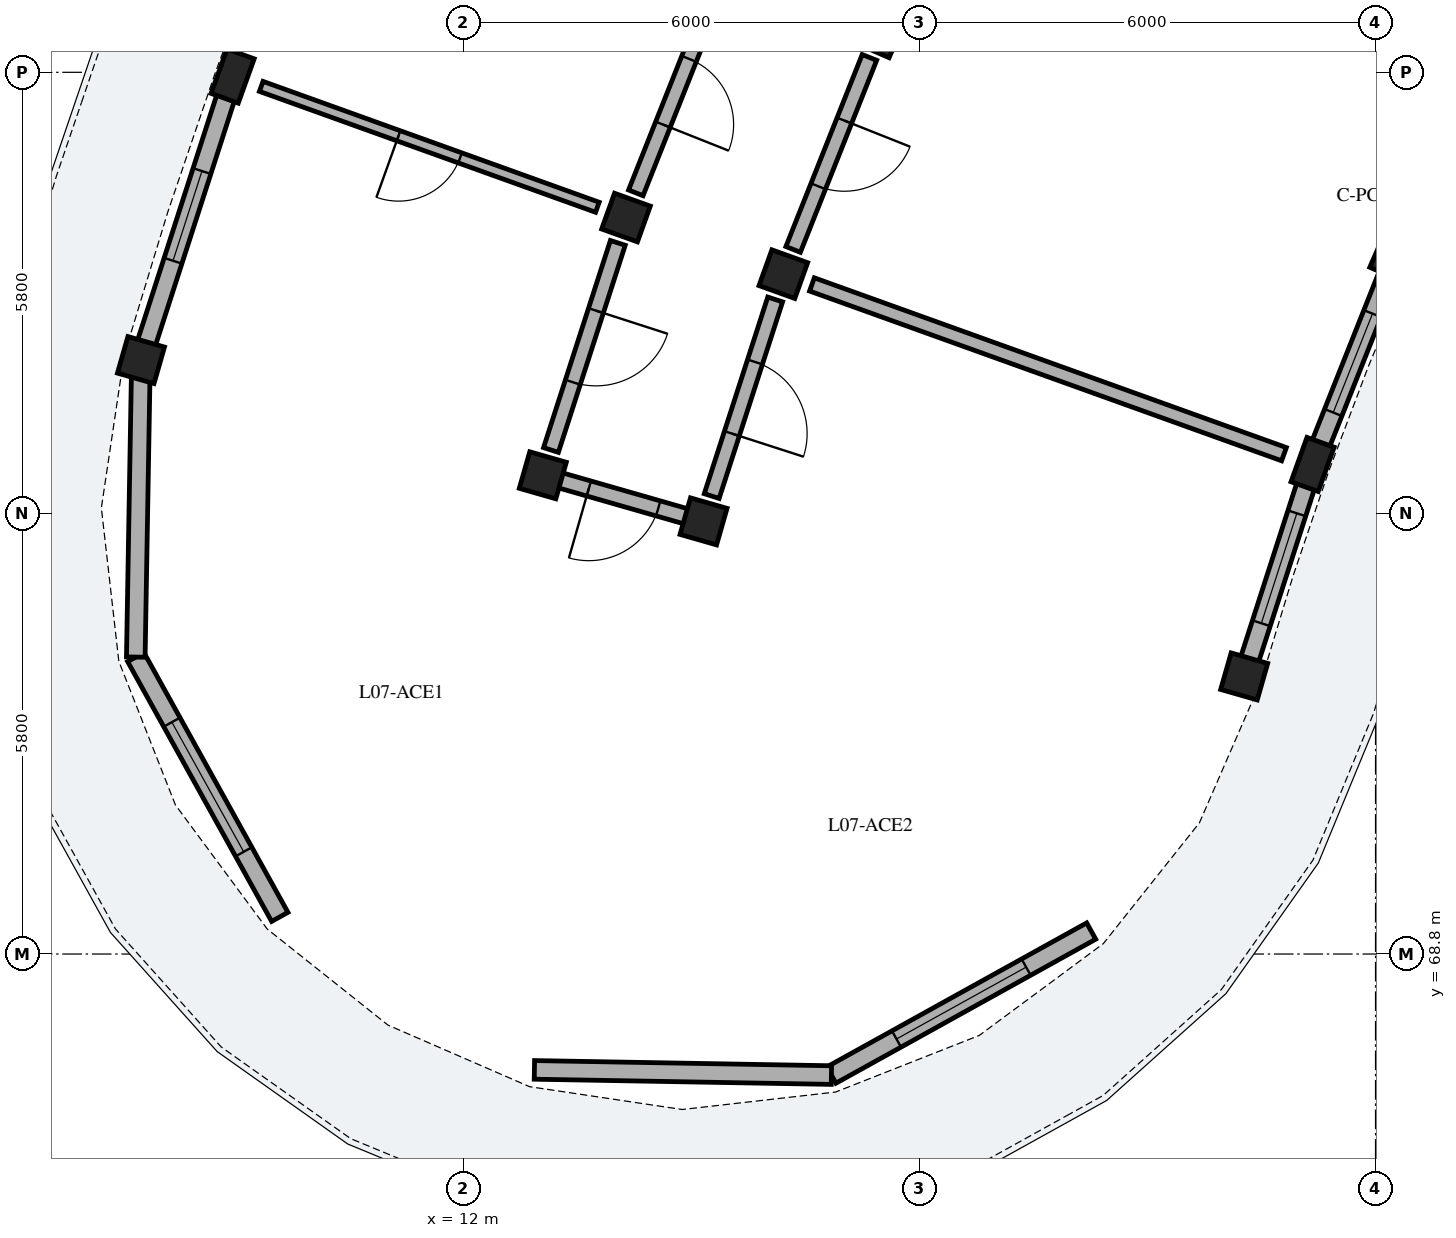
"""IFC4 building model, lengths in metres.
Left out: names, types, materials, properties, quantities, classifications, styles, units other than length and angle.
Written with IfcOpenShell. Run it as: python <this file> out.ifc"""

import sys

from ifc_helpers import new_model, si_unit, direction, frame, frame_2d, origin, origin_2d, place, context, subcontext, project, spatial, rectangle, extrude, element, fill, save


model = new_model("IFC4")
c1 = context("Model", 3, precision=1e-05, world=origin(), true_north=direction((0.0, 1.0)))
c2 = subcontext(c1, "Body", "Model", "MODEL_VIEW")
j1 = project(units=[si_unit("LENGTHUNIT", "METRE"), si_unit("PLANEANGLEUNIT", "RADIAN")], contexts=[c1])
p1 = place(None, origin())
s1 = spatial("IfcSite", under=j1, at=p1, CompositionType="ELEMENT")
p2 = place(p1, origin())
s2 = spatial("IfcBuilding", under=s1, at=p2, CompositionType="ELEMENT")
p3 = place(p2, frame((0.0, 0.0, 25.64)))
s3 = spatial("IfcBuildingStorey", under=s2, at=p3, CompositionType="ELEMENT", Elevation=25.64)
for number, where, z_axis, x_axis in (
    (1, (24.254, 77.964, 0.0), (0.0, 0.0, 1.0), (-0.917, 0.4, 0.0)),
    (2, (17.47, 80.921, 0.0), (0.0, 0.0, 1.0), (-0.917, 0.4, 0.0)),
):
    element("IfcColumn", number, at=place(p3, frame(where, z_axis=z_axis, x_axis=x_axis)), inside=s3, PredefinedType="COLUMN", context=c2, shape_type="SweptSolid", body=[
        extrude(rectangle(XDim=0.5, YDim=0.5, at=origin_2d()), origin(), (0.0, 0.0, 1.0), 3.11),
    ])
p4 = place(p3, frame((23.172, 75.241, 0.0), z_axis=(0.0, 0.0, 1.0), x_axis=(-0.941012100316, 0.338372911236, 0.0)))
e3 = element("IfcColumn", 3, at=p4, inside=s3, PredefinedType="PILASTER", context=c2, shape_type="SweptSolid", body=[
    extrude(rectangle(XDim=0.38, YDim=0.62, at=origin_2d()), origin(), (0.0, 0.0, 1.0), 3.11),
])
for number, where, z_axis, x_axis in (
    (4, (16.208, 77.745, 0.0), (0.0, 0.0, 1.0), (-0.941, 0.338, 0.0)),
    (5, (14.138, 78.489, 0.0), (0.0, 0.0, 1.0), (-0.941, 0.338, 0.0)),
):
    element("IfcColumn", number, at=place(p3, frame(where, z_axis=z_axis, x_axis=x_axis)), inside=s3, PredefinedType="COLUMN", context=c2, shape_type="SweptSolid", body=[
        extrude(rectangle(XDim=0.5, YDim=0.5, at=origin_2d()), origin(), (0.0, 0.0, 1.0), 3.11),
    ])
p5 = place(p3, frame((8.963, 80.35, 0.0), z_axis=(0.0, 0.0, 1.0), x_axis=(-0.941012100316, 0.338372911236, 0.0)))
e6 = element("IfcColumn", 6, at=p5, inside=s3, PredefinedType="PILASTER", context=c2, shape_type="SweptSolid", body=[
    extrude(rectangle(XDim=0.38, YDim=0.62, at=origin_2d()), origin(), (0.0, 0.0, 1.0), 3.11),
])
for number, where, z_axis, x_axis in (
    (7, (22.272, 72.452, 0.0), (0.0, 0.0, 1.0), (-0.961, 0.276, 0.0)),
    (8, (15.159, 74.492, 0.0), (0.0, 0.0, 1.0), (-0.961, 0.276, 0.0)),
    (9, (13.044, 75.098, 0.0), (0.0, 0.0, 1.0), (-0.961, 0.276, 0.0)),
    (10, (7.757, 76.614, 0.0), (0.0, 0.0, 1.0), (-0.961, 0.276, 0.0)),
):
    element("IfcColumn", number, at=place(p3, frame(where, z_axis=z_axis, x_axis=x_axis)), inside=s3, PredefinedType="COLUMN", context=c2, shape_type="SweptSolid", body=[
        extrude(rectangle(XDim=0.5, YDim=0.5, at=origin_2d()), origin(), (0.0, 0.0, 1.0), 3.11),
    ])
p6 = place(p3, frame((24.173, 77.76, 0.0), z_axis=(0.0, 0.0, 1.0), x_axis=(-0.36914482699, -0.92937188289, 0.0)))
e11 = element("IfcWall", 11, at=p6, inside=s3, PredefinedType="SOLIDWALL", context=c2, shape_type="SweptSolid", body=[
    extrude(rectangle(XDim=2.55, YDim=0.245, at=frame_2d((1.275, 0.0))), origin(), (0.0, 0.0, 1.0), 2.355),
])
p7 = place(p6, frame((0.575, 0.0, 0.55)))
e12 = element("IfcOpeningElement", 12, at=p7, cuts=e11, PredefinedType="OPENING", context=c2, shape_type="SweptSolid", body=[
    extrude(rectangle(XDim=1.4, YDim=1.635, at=frame_2d((0.7, 0.817))), frame((0.0, 0.133, 0.0), z_axis=(0.0, -1.0, 0.0), x_axis=(1.0, 0.0, 0.0)), (0.0, 0.0, 1.0), 0.265),
])
p8 = place(p3, frame((8.914, 80.198, 0.0), z_axis=(0.0, 0.0, 1.0), x_axis=(-0.30716573199, -0.951656037175, 0.0)))
e13 = element("IfcWall", 13, at=p8, inside=s3, PredefinedType="SOLIDWALL", context=c2, shape_type="SweptSolid", body=[
    extrude(rectangle(XDim=3.546, YDim=0.245, at=frame_2d((1.773, 0.0))), origin(), (0.0, 0.0, 1.0), 2.355),
])
p9 = place(p8, frame((1.153, 0.0, 0.55)))
e14 = element("IfcOpeningElement", 14, at=p9, cuts=e13, PredefinedType="OPENING", context=c2, shape_type="SweptSolid", body=[
    extrude(rectangle(XDim=1.24, YDim=1.535, at=frame_2d((0.62, 0.768))), frame((0.0, 0.133, 0.0), z_axis=(0.0, -1.0, 0.0), x_axis=(1.0, 0.0, 0.0)), (0.0, 0.0, 1.0), 0.265),
])
p10 = place(p3, frame((23.123, 75.088, 0.0), z_axis=(0.0, 0.0, 1.0), x_axis=(-0.307109066975, -0.951674325062, 0.0)))
e15 = element("IfcWall", 15, at=p10, inside=s3, PredefinedType="SOLIDWALL", context=c2, shape_type="SweptSolid", body=[
    extrude(rectangle(XDim=2.55, YDim=0.245, at=frame_2d((1.275, 0.0))), origin(), (0.0, 0.0, 1.0), 2.355),
])
p11 = place(p10, frame((0.515, 0.0, 0.55)))
e16 = element("IfcOpeningElement", 16, at=p11, cuts=e15, PredefinedType="OPENING", context=c2, shape_type="SweptSolid", body=[
    extrude(rectangle(XDim=1.52, YDim=1.485, at=frame_2d((0.76, 0.743))), frame((0.0, 0.133, 0.0), z_axis=(0.0, -1.0, 0.0), x_axis=(1.0, 0.0, 0.0)), (0.0, 0.0, 1.0), 0.265),
])
p12 = place(p3, frame((20.259, 69.102, 0.0), z_axis=(0.0, 0.0, 1.0), x_axis=(-0.874643043537, -0.484767517881, 0.0)))
e17 = element("IfcWall", 17, at=p12, inside=s3, PredefinedType="SOLIDWALL", context=c2, shape_type="SweptSolid", body=[
    extrude(rectangle(XDim=3.908, YDim=0.245, at=frame_2d((1.954, 0.0))), origin(), (0.0, 0.0, 1.0), 2.355),
])
p13 = place(p12, frame((0.979, 0.0, 0.4)))
e18 = element("IfcOpeningElement", 18, at=p13, cuts=e17, PredefinedType="OPENING", context=c2, shape_type="SweptSolid", body=[
    extrude(rectangle(XDim=1.95, YDim=1.78, at=frame_2d((0.975, 0.89))), frame((0.0, 0.133, 0.0), z_axis=(0.0, -1.0, 0.0), x_axis=(1.0, 0.0, 0.0)), (0.0, 0.0, 1.0), 0.265),
])
p14 = place(p3, frame((16.841, 67.208, 0.0), z_axis=(0.0, 0.0, 1.0), x_axis=(-0.999848096392, 0.017429404492, 0.0)))
e19 = element("IfcWall", 19, at=p14, inside=s3, PredefinedType="SOLIDWALL", context=c2, shape_type="SweptSolid", body=[
    extrude(rectangle(XDim=3.908, YDim=0.245, at=frame_2d((1.954, 0.0))), origin(), (0.0, 0.0, 1.0), 2.355),
])
p15 = place(p3, frame((9.583, 69.289, 0.0), z_axis=(0.0, 0.0, 1.0), x_axis=(-0.484841794757, 0.874601871743, 0.0)))
e20 = element("IfcWall", 20, at=p15, inside=s3, PredefinedType="SOLIDWALL", context=c2, shape_type="SweptSolid", body=[
    extrude(rectangle(XDim=3.908, YDim=0.245, at=frame_2d((1.954, 0.0))), origin(), (0.0, 0.0, 1.0), 2.355),
])
p16 = place(p15, frame((0.979, 0.0, 0.4)))
e21 = element("IfcOpeningElement", 21, at=p16, cuts=e20, PredefinedType="OPENING", context=c2, shape_type="SweptSolid", body=[
    extrude(rectangle(XDim=1.95, YDim=1.78, at=frame_2d((0.975, 0.89))), frame((0.0, 0.133, 0.0), z_axis=(0.0, -1.0, 0.0), x_axis=(1.0, 0.0, 0.0)), (0.0, 0.0, 1.0), 0.265),
])
p17 = place(p3, frame((7.689, 72.707, 0.0), z_axis=(0.0, 0.0, 1.0), x_axis=(0.017428315893, 0.999848115368, 0.0)))
e22 = element("IfcWall", 22, at=p17, inside=s3, PredefinedType="SOLIDWALL", context=c2, shape_type="SweptSolid", body=[
    extrude(rectangle(XDim=3.908, YDim=0.245, at=frame_2d((1.954, 0.0))), origin(), (0.0, 0.0, 1.0), 2.355),
])
p18 = place(p3, frame((15.325, 81.475, 0.0), z_axis=(0.0, 0.0, 1.0), x_axis=(-0.369213832442, -0.929344471083, 0.0)))
e23 = element("IfcWall", 23, at=p18, inside=s3, PredefinedType="PARTITIONING", context=c2, shape_type="SweptSolid", body=[
    extrude(rectangle(XDim=2.863, YDim=0.205, at=frame_2d((1.432, 0.0))), origin(), (0.0, 0.0, 1.0), 2.37),
])
p19 = place(p18, frame((0.967, 0.0, 0.0)))
e24 = element("IfcOpeningElement", 24, at=p19, cuts=e23, PredefinedType="OPENING", context=c2, shape_type="SweptSolid", body=[
    extrude(rectangle(XDim=0.93, YDim=2.12, at=frame_2d((0.465, 1.06))), frame((0.0, 0.113, 0.0), z_axis=(0.0, -1.0, 0.0), x_axis=(1.0, 0.0, 0.0)), (0.0, 0.0, 1.0), 0.225),
])
p20 = place(p3, frame((17.341, 80.596, 0.0), z_axis=(0.0, 0.0, 1.0), x_axis=(-0.369237170461, -0.929335198919, 0.0)))
e25 = element("IfcWall", 25, at=p20, inside=s3, PredefinedType="PARTITIONING", context=c2, shape_type="SweptSolid", body=[
    extrude(rectangle(XDim=2.718, YDim=0.205, at=frame_2d((1.359, 0.0))), origin(), (0.0, 0.0, 1.0), 2.37),
])
p21 = place(p20, frame((0.894, 0.0, 0.0)))
e26 = element("IfcOpeningElement", 26, at=p21, cuts=e25, PredefinedType="OPENING", context=c2, shape_type="SweptSolid", body=[
    extrude(rectangle(XDim=0.93, YDim=2.12, at=frame_2d((0.465, 1.06))), frame((0.0, 0.113, 0.0), z_axis=(0.0, -1.0, 0.0), x_axis=(1.0, 0.0, 0.0)), (0.0, 0.0, 1.0), 0.225),
])
p22 = place(p3, frame((13.762, 78.625, 0.0), z_axis=(0.0, 0.0, 1.0), x_axis=(-0.941015806044, 0.338362605463, 0.0)))
e27 = element("IfcWall", 27, at=p22, inside=s3, PredefinedType="PLUMBINGWALL", context=c2, shape_type="SweptSolid", body=[
    extrude(rectangle(XDim=4.7, YDim=0.14, at=frame_2d((2.35, 0.0))), origin(), (0.0, 0.0, 1.0), 2.37),
])
p23 = place(p22, frame((1.92, 0.0, 0.0)))
e28 = element("IfcOpeningElement", 28, at=p23, cuts=e27, PredefinedType="OPENING", context=c2, shape_type="SweptSolid", body=[
    extrude(rectangle(XDim=0.86, YDim=2.06, at=frame_2d((0.43, 1.03))), frame((0.0, 0.08, 0.0), z_axis=(0.0, -1.0, 0.0), x_axis=(1.0, 0.0, 0.0)), (0.0, 0.0, 1.0), 0.16),
])
p24 = place(p3, frame((22.796, 75.376, 0.0), z_axis=(0.0, 0.0, 1.0), x_axis=(-0.941005714099, 0.338390670725, 0.0)))
e29 = element("IfcWall", 29, at=p24, inside=s3, PredefinedType="PARTITIONING", context=c2, shape_type="SweptSolid", body=[
    extrude(rectangle(XDim=6.6, YDim=0.185, at=frame_2d((3.3, 0.0))), origin(), (0.0, 0.0, 1.0), 2.37),
])
p25 = place(p3, frame((14.031, 78.156, 0.0), z_axis=(0.0, 0.0, 1.0), x_axis=(-0.307132325305, -0.951666819193, 0.0)))
e30 = element("IfcWall", 30, at=p25, inside=s3, PredefinedType="PARTITIONING", context=c2, shape_type="SweptSolid", body=[
    extrude(rectangle(XDim=2.863, YDim=0.205, at=frame_2d((1.432, 0.0))), origin(), (0.0, 0.0, 1.0), 2.37),
])
p26 = place(p25, frame((0.937, 0.0, 0.0)))
e31 = element("IfcOpeningElement", 31, at=p26, cuts=e30, PredefinedType="OPENING", context=c2, shape_type="SweptSolid", body=[
    extrude(rectangle(XDim=0.99, YDim=2.16, at=frame_2d((0.495, 1.08))), frame((0.0, 0.113, 0.0), z_axis=(0.0, -1.0, 0.0), x_axis=(1.0, 0.0, 0.0)), (0.0, 0.0, 1.0), 0.225),
])
p27 = place(p3, frame((16.101, 77.412, 0.0), z_axis=(0.0, 0.0, 1.0), x_axis=(-0.307186478934, -0.95164934044, 0.0)))
e32 = element("IfcWall", 32, at=p27, inside=s3, PredefinedType="PARTITIONING", context=c2, shape_type="SweptSolid", body=[
    extrude(rectangle(XDim=2.718, YDim=0.205, at=frame_2d((1.359, 0.0))), origin(), (0.0, 0.0, 1.0), 2.37),
])
p28 = place(p27, frame((0.864, 0.0, 0.0)))
e33 = element("IfcOpeningElement", 33, at=p28, cuts=e32, PredefinedType="OPENING", context=c2, shape_type="SweptSolid", body=[
    extrude(rectangle(XDim=0.99, YDim=2.16, at=frame_2d((0.495, 1.08))), frame((0.0, 0.113, 0.0), z_axis=(0.0, -1.0, 0.0), x_axis=(1.0, 0.0, 0.0)), (0.0, 0.0, 1.0), 0.225),
])
p29 = place(p3, frame((15.111, 74.506, 0.0), z_axis=(0.0, 0.0, 1.0), x_axis=(-0.961264701934, 0.275626872449, 0.0)))
e34 = element("IfcWall", 34, at=p29, inside=s3, PredefinedType="PARTITIONING", context=c2, shape_type="SweptSolid", body=[
    extrude(rectangle(XDim=2.1, YDim=0.205, at=frame_2d((1.05, 0.0))), origin(), (0.0, 0.0, 1.0), 2.37),
])
p30 = place(p29, frame((0.57, 0.0, 0.0)))
e35 = element("IfcOpeningElement", 35, at=p30, cuts=e34, PredefinedType="OPENING", context=c2, shape_type="SweptSolid", body=[
    extrude(rectangle(XDim=0.95, YDim=2.13, at=frame_2d((0.475, 1.065))), frame((0.0, 0.113, 0.0), z_axis=(0.0, -1.0, 0.0), x_axis=(1.0, 0.0, 0.0)), (0.0, 0.0, 1.0), 0.225),
])
p31 = place(p7, origin())
e36 = element("IfcWindow", 36, at=p31, inside=s3, PartitioningType="SINGLE_PANEL", PredefinedType="WINDOW", context=c2, shape_type="SweptSolid", body=[
    extrude(rectangle(XDim=1.4, YDim=1.635, at=frame_2d((0.7, 0.817))), frame((0.0, 0.03, 0.0), z_axis=(0.0, -1.0, 0.0), x_axis=(1.0, 0.0, 0.0)), (0.0, 0.0, 1.0), 0.06),
])
fill(e12, e36)
p32 = place(p9, origin())
e37 = element("IfcWindow", 37, at=p32, inside=s3, PartitioningType="SINGLE_PANEL", PredefinedType="WINDOW", context=c2, shape_type="SweptSolid", body=[
    extrude(rectangle(XDim=1.24, YDim=1.535, at=frame_2d((0.62, 0.768))), frame((0.0, 0.03, 0.0), z_axis=(0.0, -1.0, 0.0), x_axis=(1.0, 0.0, 0.0)), (0.0, 0.0, 1.0), 0.06),
])
fill(e14, e37)
p33 = place(p11, origin())
e38 = element("IfcWindow", 38, at=p33, inside=s3, PartitioningType="SINGLE_PANEL", PredefinedType="WINDOW", context=c2, shape_type="SweptSolid", body=[
    extrude(rectangle(XDim=1.52, YDim=1.485, at=frame_2d((0.76, 0.743))), frame((0.0, 0.03, 0.0), z_axis=(0.0, -1.0, 0.0), x_axis=(1.0, 0.0, 0.0)), (0.0, 0.0, 1.0), 0.06),
])
fill(e16, e38)
p34 = place(p13, origin())
e39 = element("IfcWindow", 39, at=p34, inside=s3, PartitioningType="SINGLE_PANEL", PredefinedType="WINDOW", context=c2, shape_type="SweptSolid", body=[
    extrude(rectangle(XDim=1.95, YDim=1.78, at=frame_2d((0.975, 0.89))), frame((0.0, 0.03, 0.0), z_axis=(0.0, -1.0, 0.0), x_axis=(1.0, 0.0, 0.0)), (0.0, 0.0, 1.0), 0.06),
])
fill(e18, e39)
p35 = place(p16, origin())
e40 = element("IfcWindow", 40, at=p35, inside=s3, PartitioningType="SINGLE_PANEL", PredefinedType="WINDOW", context=c2, shape_type="SweptSolid", body=[
    extrude(rectangle(XDim=1.95, YDim=1.78, at=frame_2d((0.975, 0.89))), frame((0.0, 0.03, 0.0), z_axis=(0.0, -1.0, 0.0), x_axis=(1.0, 0.0, 0.0)), (0.0, 0.0, 1.0), 0.06),
])
fill(e21, e40)
p36 = place(p19, origin())
e41 = element("IfcDoor", 41, at=p36, inside=s3, OperationType="SINGLE_SWING_RIGHT", PredefinedType="DOOR", context=c2, shape_type="SweptSolid", body=[
    extrude(rectangle(XDim=0.93, YDim=2.12, at=frame_2d((0.465, 1.06))), frame((0.0, 0.025, 0.0), z_axis=(0.0, -1.0, 0.0), x_axis=(1.0, 0.0, 0.0)), (0.0, 0.0, 1.0), 0.05),
])
fill(e24, e41)
p37 = place(p21, origin())
e42 = element("IfcDoor", 42, at=p37, inside=s3, OperationType="SINGLE_SWING_LEFT", PredefinedType="DOOR", context=c2, shape_type="SweptSolid", body=[
    extrude(rectangle(XDim=0.93, YDim=2.12, at=frame_2d((0.465, 1.06))), frame((0.0, 0.025, 0.0), z_axis=(0.0, -1.0, 0.0), x_axis=(1.0, 0.0, 0.0)), (0.0, 0.0, 1.0), 0.05),
])
fill(e26, e42)
p38 = place(p23, origin())
e43 = element("IfcDoor", 43, at=p38, inside=s3, OperationType="SINGLE_SWING_RIGHT", PredefinedType="DOOR", context=c2, shape_type="SweptSolid", body=[
    extrude(rectangle(XDim=0.86, YDim=2.06, at=frame_2d((0.43, 1.03))), frame((0.0, 0.025, 0.0), z_axis=(0.0, -1.0, 0.0), x_axis=(1.0, 0.0, 0.0)), (0.0, 0.0, 1.0), 0.05),
])
fill(e28, e43)
p39 = place(p26, origin())
e44 = element("IfcDoor", 44, at=p39, inside=s3, OperationType="SINGLE_SWING_LEFT", PredefinedType="DOOR", context=c2, shape_type="SweptSolid", body=[
    extrude(rectangle(XDim=0.99, YDim=2.16, at=frame_2d((0.495, 1.08))), frame((0.0, 0.025, 0.0), z_axis=(0.0, -1.0, 0.0), x_axis=(1.0, 0.0, 0.0)), (0.0, 0.0, 1.0), 0.05),
])
fill(e31, e44)
p40 = place(p28, origin())
e45 = element("IfcDoor", 45, at=p40, inside=s3, OperationType="SINGLE_SWING_RIGHT", PredefinedType="DOOR", context=c2, shape_type="SweptSolid", body=[
    extrude(rectangle(XDim=0.99, YDim=2.16, at=frame_2d((0.495, 1.08))), frame((0.0, 0.025, 0.0), z_axis=(0.0, -1.0, 0.0), x_axis=(1.0, 0.0, 0.0)), (0.0, 0.0, 1.0), 0.05),
])
fill(e33, e45)
p41 = place(p30, origin())
e46 = element("IfcDoor", 46, at=p41, inside=s3, OperationType="SINGLE_SWING_RIGHT", PredefinedType="DOOR", context=c2, shape_type="SweptSolid", body=[
    extrude(rectangle(XDim=0.95, YDim=2.13, at=frame_2d((0.475, 1.065))), frame((0.0, 0.025, 0.0), z_axis=(0.0, -1.0, 0.0), x_axis=(1.0, 0.0, 0.0)), (0.0, 0.0, 1.0), 0.05),
])
fill(e35, e46)
save(model, sys.argv[1])
